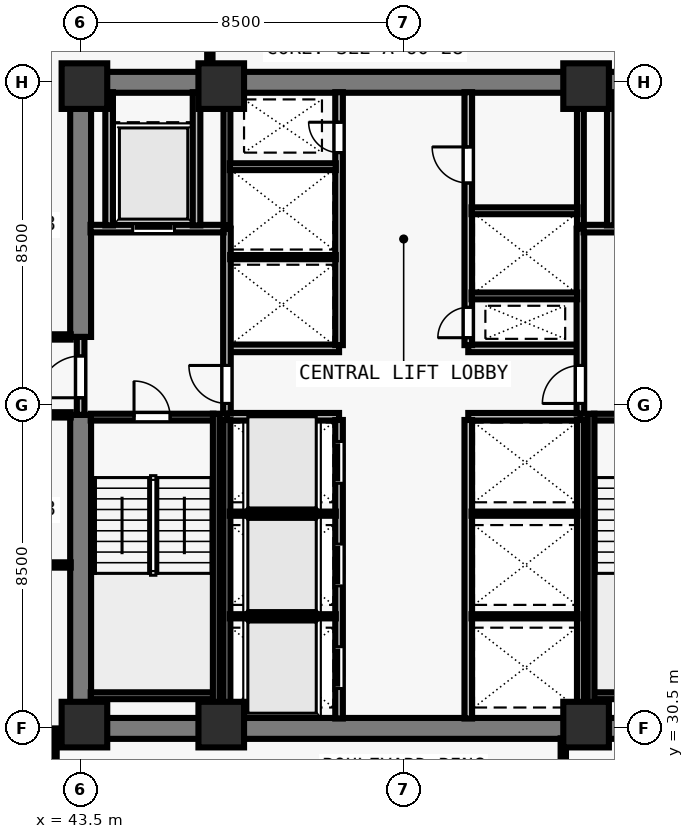
"""IFC4 building model, lengths in metres.
Left out: names, types, materials, properties, quantities, classifications, styles, units other than length and angle.
Written with IfcOpenShell. Run it as: python <this file> out.ifc"""

import sys

from ifc_helpers import new_model, si_unit, direction, frame, frame_2d, origin, origin_2d, place, context, subcontext, project, spatial, rectangle, extrude, element, fill, save


model = new_model("IFC4")
c1 = context("Model", 3, precision=1e-05, world=origin(), true_north=direction((0.0, 1.0)))
c2 = subcontext(c1, "Body", "Model", "MODEL_VIEW")
j1 = project(units=[si_unit("LENGTHUNIT", "METRE"), si_unit("PLANEANGLEUNIT", "RADIAN")], contexts=[c1])
p1 = place(None, origin())
s1 = spatial("IfcSite", under=j1, at=p1, CompositionType="ELEMENT")
p2 = place(p1, origin())
s2 = spatial("IfcBuilding", under=s1, at=p2, CompositionType="ELEMENT")
p3 = place(p2, frame((0.0, 0.0, 93.5)))
s3 = spatial("IfcBuildingStorey", under=s2, at=p3, CompositionType="ELEMENT", Elevation=93.5)
for number, where, z_axis, x_axis in (
    (1, (43.6, 30.6, 0.0), (0.0, 0.0, 1.0), (1.0, 0.0, 0.0)),
    (2, (47.2, 30.6, 0.0), (0.0, 0.0, 1.0), (1.0, 0.0, 0.0)),
    (3, (56.8, 30.6, 0.0), (0.0, 0.0, 1.0), (1.0, 0.0, 0.0)),
    (4, (43.6, 47.4, 0.0), (0.0, 0.0, 1.0), (1.0, 0.0, 0.0)),
    (5, (47.2, 47.4, 0.0), (0.0, 0.0, 1.0), (1.0, 0.0, 0.0)),
    (6, (56.8, 47.4, 0.0), (0.0, 0.0, 1.0), (1.0, 0.0, 0.0)),
):
    element("IfcColumn", number, at=place(p3, frame(where, z_axis=z_axis, x_axis=x_axis)), inside=s3, PredefinedType="COLUMN", context=c2, shape_type="SweptSolid", body=[
        extrude(rectangle(XDim=1.2, YDim=1.2, at=origin_2d()), origin(), (0.0, 0.0, 1.0), 3.5),
    ])
for number, where, z_axis, x_axis in (
    (7, (43.225, 30.5, 0.0), (0.0, 0.0, 1.0), (1.0, 0.0, 0.0)),
    (8, (43.225, 47.5, 0.0), (0.0, 0.0, 1.0), (1.0, 0.0, 0.0)),
):
    element("IfcWall", number, at=place(p3, frame(where, z_axis=z_axis, x_axis=x_axis)), inside=s3, PredefinedType="SHEAR", context=c2, shape_type="SweptSolid", body=[
        extrude(rectangle(XDim=17.55, YDim=0.55, at=frame_2d((8.775, 0.0))), origin(), (0.0, 0.0, 1.0), 3.24),
    ])
p4 = place(p3, frame((43.5, 30.765, 0.0), z_axis=(0.0, 0.0, 1.0), x_axis=(0.0, 1.0, 0.0)))
e9 = element("IfcWall", 9, at=p4, inside=s3, PredefinedType="SHEAR", context=c2, shape_type="SweptSolid", body=[
    extrude(rectangle(XDim=7.985, YDim=0.55, at=frame_2d((3.993, 0.0))), origin(), (0.0, 0.0, 1.0), 3.24),
])
p5 = place(p3, frame((43.5, 40.8, 0.0), z_axis=(0.0, 0.0, 1.0), x_axis=(0.0, 1.0, 0.0)))
e10 = element("IfcWall", 10, at=p5, inside=s3, PredefinedType="SHEAR", context=c2, shape_type="SweptSolid", body=[
    extrude(rectangle(XDim=6.435, YDim=0.55, at=frame_2d((3.218, 0.0))), origin(), (0.0, 0.0, 1.0), 3.24),
])
for number, where, z_axis, x_axis in (
    (11, (47.35, 38.7, 0.0), (0.0, 0.0, 1.0), (1.0, 0.0, 0.0)),
    (12, (47.35, 40.5, 0.0), (0.0, 0.0, 1.0), (1.0, 0.0, 0.0)),
    (13, (53.7, 38.7, 0.0), (0.0, 0.0, 1.0), (1.0, 0.0, 0.0)),
    (14, (53.7, 40.5, 0.0), (0.0, 0.0, 1.0), (1.0, 0.0, 0.0)),
):
    element("IfcWall", number, at=place(p3, frame(where, z_axis=z_axis, x_axis=x_axis)), inside=s3, PredefinedType="SOLIDWALL", context=c2, shape_type="SweptSolid", body=[
        extrude(rectangle(XDim=2.95, YDim=0.2, at=frame_2d((1.475, 0.0))), origin(), (0.0, 0.0, 1.0), 3.24),
    ])
p6 = place(p3, frame((50.3, 30.76, 0.0), z_axis=(0.0, 0.0, 1.0), x_axis=(0.0, 1.0, 0.0)))
e15 = element("IfcWall", 15, at=p6, inside=s3, PredefinedType="SOLIDWALL", context=c2, shape_type="SweptSolid", body=[
    extrude(rectangle(XDim=7.855, YDim=0.2, at=frame_2d((3.927, 0.0))), origin(), (0.0, 0.0, 1.0), 3.24),
])
p7 = place(p6, frame((0.79, 0.0, 0.0)))
e16 = element("IfcOpeningElement", 16, at=p7, cuts=e15, PredefinedType="OPENING", context=c2, shape_type="SweptSolid", body=[
    extrude(rectangle(XDim=1.1, YDim=2.2, at=frame_2d((0.55, 1.1))), frame((0.0, 0.11, 0.0), z_axis=(0.0, -1.0, 0.0), x_axis=(1.0, 0.0, 0.0)), (0.0, 0.0, 1.0), 0.22),
])
p8 = place(p6, frame((3.49, 0.0, 0.0)))
e17 = element("IfcOpeningElement", 17, at=p8, cuts=e15, PredefinedType="OPENING", context=c2, shape_type="SweptSolid", body=[
    extrude(rectangle(XDim=1.1, YDim=2.2, at=frame_2d((0.55, 1.1))), frame((0.0, 0.11, 0.0), z_axis=(0.0, -1.0, 0.0), x_axis=(1.0, 0.0, 0.0)), (0.0, 0.0, 1.0), 0.22),
])
p9 = place(p6, frame((6.19, 0.0, 0.0)))
e18 = element("IfcOpeningElement", 18, at=p9, cuts=e15, PredefinedType="OPENING", context=c2, shape_type="SweptSolid", body=[
    extrude(rectangle(XDim=1.1, YDim=2.2, at=frame_2d((0.55, 1.1))), frame((0.0, 0.11, 0.0), z_axis=(0.0, -1.0, 0.0), x_axis=(1.0, 0.0, 0.0)), (0.0, 0.0, 1.0), 0.22),
])
p10 = place(p3, frame((53.7, 30.76, 0.0), z_axis=(0.0, 0.0, 1.0), x_axis=(0.0, 1.0, 0.0)))
e19 = element("IfcWall", 19, at=p10, inside=s3, PredefinedType="SOLIDWALL", context=c2, shape_type="SweptSolid", body=[
    extrude(rectangle(XDim=7.855, YDim=0.2, at=frame_2d((3.927, 0.0))), origin(), (0.0, 0.0, 1.0), 3.24),
])
p11 = place(p3, frame((50.3, 40.585, 0.0), z_axis=(0.0, 0.0, 1.0), x_axis=(0.0, 1.0, 0.0)))
e20 = element("IfcWall", 20, at=p11, inside=s3, PredefinedType="SOLIDWALL", context=c2, shape_type="SweptSolid", body=[
    extrude(rectangle(XDim=6.655, YDim=0.2, at=frame_2d((3.328, 0.0))), origin(), (0.0, 0.0, 1.0), 3.24),
])
p12 = place(p11, frame((5.065, 0.0, 0.0)))
e21 = element("IfcOpeningElement", 21, at=p12, cuts=e20, PredefinedType="OPENING", context=c2, shape_type="SweptSolid", body=[
    extrude(rectangle(XDim=0.8, YDim=2.08, at=frame_2d((0.4, 1.04))), frame((0.0, 0.11, 0.0), z_axis=(0.0, -1.0, 0.0), x_axis=(1.0, 0.0, 0.0)), (0.0, 0.0, 1.0), 0.22),
])
p13 = place(p3, frame((53.7, 40.585, 0.0), z_axis=(0.0, 0.0, 1.0), x_axis=(0.0, 1.0, 0.0)))
e22 = element("IfcWall", 22, at=p13, inside=s3, PredefinedType="SOLIDWALL", context=c2, shape_type="SweptSolid", body=[
    extrude(rectangle(XDim=6.655, YDim=0.2, at=frame_2d((3.328, 0.0))), origin(), (0.0, 0.0, 1.0), 3.24),
])
p14 = place(p13, frame((0.195, 0.0, 0.0)))
e23 = element("IfcOpeningElement", 23, at=p14, cuts=e22, PredefinedType="OPENING", context=c2, shape_type="SweptSolid", body=[
    extrude(rectangle(XDim=0.8, YDim=2.08, at=frame_2d((0.4, 1.04))), frame((0.0, 0.11, 0.0), z_axis=(0.0, -1.0, 0.0), x_axis=(1.0, 0.0, 0.0)), (0.0, 0.0, 1.0), 0.22),
])
p15 = place(p13, frame((4.265, 0.0, 0.0)))
e24 = element("IfcOpeningElement", 24, at=p15, cuts=e22, PredefinedType="OPENING", context=c2, shape_type="SweptSolid", body=[
    extrude(rectangle(XDim=0.95, YDim=2.12, at=frame_2d((0.475, 1.06))), frame((0.0, 0.11, 0.0), z_axis=(0.0, -1.0, 0.0), x_axis=(1.0, 0.0, 0.0)), (0.0, 0.0, 1.0), 0.22),
])
p16 = place(p3, frame((43.5, 38.75, 0.0), z_axis=(0.0, 0.0, 1.0), x_axis=(0.0, 1.0, 0.0)))
e25 = element("IfcWall", 25, at=p16, inside=s3, PredefinedType="SOLIDWALL", context=c2, shape_type="SweptSolid", body=[
    extrude(rectangle(XDim=2.05, YDim=0.2, at=frame_2d((1.025, 0.0))), origin(), (0.0, 0.0, 1.0), 3.24),
])
p17 = place(p16, frame((0.45, 0.0, 0.0)))
e26 = element("IfcOpeningElement", 26, at=p17, cuts=e25, PredefinedType="OPENING", context=c2, shape_type="SweptSolid", body=[
    extrude(rectangle(XDim=1.1, YDim=2.15, at=frame_2d((0.55, 1.075))), frame((0.0, 0.11, 0.0), z_axis=(0.0, -1.0, 0.0), x_axis=(1.0, 0.0, 0.0)), (0.0, 0.0, 1.0), 0.22),
])
p18 = place(p3, frame((47.35, 38.785, 0.0), z_axis=(0.0, 0.0, 1.0), x_axis=(0.0, 1.0, 0.0)))
e27 = element("IfcWall", 27, at=p18, inside=s3, PredefinedType="SOLIDWALL", context=c2, shape_type="SweptSolid", body=[
    extrude(rectangle(XDim=4.865, YDim=0.2, at=frame_2d((2.433, 0.0))), origin(), (0.0, 0.0, 1.0), 3.24),
])
p19 = place(p18, frame((0.265, 0.0, 0.0)))
e28 = element("IfcOpeningElement", 28, at=p19, cuts=e27, PredefinedType="OPENING", context=c2, shape_type="SweptSolid", body=[
    extrude(rectangle(XDim=1.0, YDim=2.15, at=frame_2d((0.5, 1.075))), frame((0.0, 0.11, 0.0), z_axis=(0.0, -1.0, 0.0), x_axis=(1.0, 0.0, 0.0)), (0.0, 0.0, 1.0), 0.22),
])
p20 = place(p3, frame((43.76, 43.65, 0.0), z_axis=(0.0, 0.0, 1.0), x_axis=(1.0, 0.0, 0.0)))
e29 = element("IfcWall", 29, at=p20, inside=s3, PredefinedType="SOLIDWALL", context=c2, shape_type="SweptSolid", body=[
    extrude(rectangle(XDim=3.505, YDim=0.2, at=frame_2d((1.752, 0.0))), origin(), (0.0, 0.0, 1.0), 3.24),
])
p21 = place(p20, frame((1.11, 0.0, 0.0)))
e30 = element("IfcOpeningElement", 30, at=p21, cuts=e29, PredefinedType="OPENING", context=c2, shape_type="SweptSolid", body=[
    extrude(rectangle(XDim=1.1, YDim=2.2, at=frame_2d((0.55, 1.1))), frame((0.0, 0.11, 0.0), z_axis=(0.0, -1.0, 0.0), x_axis=(1.0, 0.0, 0.0)), (0.0, 0.0, 1.0), 0.22),
])
for number, where, z_axis, x_axis in (
    (31, (46.55, 43.735, 0.0), (0.0, 0.0, 1.0), (0.0, 1.0, 0.0)),
    (32, (44.25, 43.735, 0.0), (0.0, 0.0, 1.0), (0.0, 1.0, 0.0)),
):
    element("IfcWall", number, at=place(p3, frame(where, z_axis=z_axis, x_axis=x_axis)), inside=s3, PredefinedType="SOLIDWALL", context=c2, shape_type="SweptSolid", body=[
        extrude(rectangle(XDim=3.505, YDim=0.2, at=frame_2d((1.752, 0.0))), origin(), (0.0, 0.0, 1.0), 3.24),
    ])
p22 = place(p3, frame((56.65, 38.785, 0.0), z_axis=(0.0, 0.0, 1.0), x_axis=(0.0, 1.0, 0.0)))
e33 = element("IfcWall", 33, at=p22, inside=s3, PredefinedType="SOLIDWALL", context=c2, shape_type="SweptSolid", body=[
    extrude(rectangle(XDim=4.865, YDim=0.2, at=frame_2d((2.433, 0.0))), origin(), (0.0, 0.0, 1.0), 3.24),
])
p23 = place(p22, frame((0.265, 0.0, 0.0)))
e34 = element("IfcOpeningElement", 34, at=p23, cuts=e33, PredefinedType="OPENING", context=c2, shape_type="SweptSolid", body=[
    extrude(rectangle(XDim=1.0, YDim=2.15, at=frame_2d((0.5, 1.075))), frame((0.0, 0.11, 0.0), z_axis=(0.0, -1.0, 0.0), x_axis=(1.0, 0.0, 0.0)), (0.0, 0.0, 1.0), 0.22),
])
p24 = place(p3, frame((56.735, 43.65, 0.0), z_axis=(0.0, 0.0, 1.0), x_axis=(1.0, 0.0, 0.0)))
e35 = element("IfcWall", 35, at=p24, inside=s3, PredefinedType="SOLIDWALL", context=c2, shape_type="SweptSolid", body=[
    extrude(rectangle(XDim=3.505, YDim=0.2, at=frame_2d((1.752, 0.0))), origin(), (0.0, 0.0, 1.0), 3.24),
])
p25 = place(p24, frame((1.295, 0.0, 0.0)))
e36 = element("IfcOpeningElement", 36, at=p25, cuts=e35, PredefinedType="OPENING", context=c2, shape_type="SweptSolid", body=[
    extrude(rectangle(XDim=1.1, YDim=2.2, at=frame_2d((0.55, 1.1))), frame((0.0, 0.11, 0.0), z_axis=(0.0, -1.0, 0.0), x_axis=(1.0, 0.0, 0.0)), (0.0, 0.0, 1.0), 0.22),
])
p26 = place(p3, frame((57.45, 43.735, 0.0), z_axis=(0.0, 0.0, 1.0), x_axis=(0.0, 1.0, 0.0)))
e37 = element("IfcWall", 37, at=p26, inside=s3, PredefinedType="SOLIDWALL", context=c2, shape_type="SweptSolid", body=[
    extrude(rectangle(XDim=3.505, YDim=0.2, at=frame_2d((1.752, 0.0))), origin(), (0.0, 0.0, 1.0), 3.24),
])
p27 = place(p3, frame((47.35, 30.76, 0.0), z_axis=(0.0, 0.0, 1.0), x_axis=(0.0, 1.0, 0.0)))
e38 = element("IfcWall", 38, at=p27, inside=s3, PredefinedType="SOLIDWALL", context=c2, shape_type="SweptSolid", body=[
    extrude(rectangle(XDim=7.855, YDim=0.18, at=frame_2d((3.927, 0.0))), origin(), (0.0, 0.0, 1.0), 3.24),
])
for number, where, z_axis, x_axis in (
    (39, (47.425, 33.45, 0.0), (0.0, 0.0, 1.0), (1.0, 0.0, 0.0)),
    (40, (47.425, 36.15, 0.0), (0.0, 0.0, 1.0), (1.0, 0.0, 0.0)),
):
    element("IfcWall", number, at=place(p3, frame(where, z_axis=z_axis, x_axis=x_axis)), inside=s3, PredefinedType="PARTITIONING", context=c2, shape_type="SweptSolid", body=[
        extrude(rectangle(XDim=2.79, YDim=0.11, at=frame_2d((1.395, 0.0))), origin(), (0.0, 0.0, 1.0), 3.24),
    ])
p28 = place(p3, frame((56.65, 30.76, 0.0), z_axis=(0.0, 0.0, 1.0), x_axis=(0.0, 1.0, 0.0)))
e41 = element("IfcWall", 41, at=p28, inside=s3, PredefinedType="SOLIDWALL", context=c2, shape_type="SweptSolid", body=[
    extrude(rectangle(XDim=7.855, YDim=0.18, at=frame_2d((3.927, 0.0))), origin(), (0.0, 0.0, 1.0), 3.24),
])
for number, where, z_axis, x_axis in (
    (42, (53.785, 33.45, 0.0), (0.0, 0.0, 1.0), (1.0, 0.0, 0.0)),
    (43, (53.785, 36.15, 0.0), (0.0, 0.0, 1.0), (1.0, 0.0, 0.0)),
):
    element("IfcWall", number, at=place(p3, frame(where, z_axis=z_axis, x_axis=x_axis)), inside=s3, PredefinedType="PARTITIONING", context=c2, shape_type="SweptSolid", body=[
        extrude(rectangle(XDim=2.79, YDim=0.11, at=frame_2d((1.395, 0.0))), origin(), (0.0, 0.0, 1.0), 3.24),
    ])
p29 = place(p3, frame((47.35, 43.735, 0.0), z_axis=(0.0, 0.0, 1.0), x_axis=(0.0, 1.0, 0.0)))
e44 = element("IfcWall", 44, at=p29, inside=s3, PredefinedType="SOLIDWALL", context=c2, shape_type="SweptSolid", body=[
    extrude(rectangle(XDim=3.505, YDim=0.18, at=frame_2d((1.752, 0.0))), origin(), (0.0, 0.0, 1.0), 3.24),
])
p30 = place(p3, frame((47.435, 42.9, 0.0), z_axis=(0.0, 0.0, 1.0), x_axis=(1.0, 0.0, 0.0)))
e45 = element("IfcWall", 45, at=p30, inside=s3, PredefinedType="PARTITIONING", context=c2, shape_type="SweptSolid", body=[
    extrude(rectangle(XDim=2.78, YDim=0.11, at=frame_2d((1.39, 0.0))), origin(), (0.0, 0.0, 1.0), 3.24),
])
p31 = place(p3, frame((47.425, 45.28, 0.0), z_axis=(0.0, 0.0, 1.0), x_axis=(1.0, 0.0, 0.0)))
e46 = element("IfcWall", 46, at=p31, inside=s3, PredefinedType="SOLIDWALL", context=c2, shape_type="SweptSolid", body=[
    extrude(rectangle(XDim=2.79, YDim=0.18, at=frame_2d((1.395, 0.0))), origin(), (0.0, 0.0, 1.0), 3.24),
])
p32 = place(p3, frame((56.65, 43.735, 0.0), z_axis=(0.0, 0.0, 1.0), x_axis=(0.0, 1.0, 0.0)))
e47 = element("IfcWall", 47, at=p32, inside=s3, PredefinedType="SOLIDWALL", context=c2, shape_type="SweptSolid", body=[
    extrude(rectangle(XDim=3.505, YDim=0.18, at=frame_2d((1.752, 0.0))), origin(), (0.0, 0.0, 1.0), 3.24),
])
p33 = place(p3, frame((53.785, 41.88, 0.0), z_axis=(0.0, 0.0, 1.0), x_axis=(1.0, 0.0, 0.0)))
e48 = element("IfcWall", 48, at=p33, inside=s3, PredefinedType="SOLIDWALL", context=c2, shape_type="SweptSolid", body=[
    extrude(rectangle(XDim=2.78, YDim=0.18, at=frame_2d((1.39, 0.0))), origin(), (0.0, 0.0, 1.0), 3.24),
])
p34 = place(p3, frame((53.785, 44.12, 0.0), z_axis=(0.0, 0.0, 1.0), x_axis=(1.0, 0.0, 0.0)))
e49 = element("IfcWall", 49, at=p34, inside=s3, PredefinedType="SOLIDWALL", context=c2, shape_type="SweptSolid", body=[
    extrude(rectangle(XDim=2.79, YDim=0.18, at=frame_2d((1.395, 0.0))), origin(), (0.0, 0.0, 1.0), 3.24),
])
for number, where, z_axis, x_axis in (
    (50, (39.655, 38.75, 0.0), (0.0, 0.0, 1.0), (1.0, 0.0, 0.0)),
    (51, (39.655, 40.8, 0.0), (0.0, 0.0, 1.0), (1.0, 0.0, 0.0)),
):
    element("IfcWall", number, at=place(p3, frame(where, z_axis=z_axis, x_axis=x_axis)), inside=s3, PredefinedType="PARTITIONING", context=c2, shape_type="SweptSolid", body=[
        extrude(rectangle(XDim=3.585, YDim=0.14, at=frame_2d((1.792, 0.0))), origin(), (0.0, 0.0, 1.0), 3.24),
    ])
p35 = place(p3, frame((42.8, 26.505, 0.0), z_axis=(0.0, 0.0, 1.0), x_axis=(0.0, 1.0, 0.0)))
e52 = element("IfcWall", 52, at=p35, inside=s3, PredefinedType="PARTITIONING", context=c2, shape_type="SweptSolid", body=[
    extrude(rectangle(XDim=3.995, YDim=0.14, at=frame_2d((1.998, 0.0))), origin(), (0.0, 0.0, 1.0), 2.399),
])
p36 = place(p3, frame((56.2, 26.505, 0.0), z_axis=(0.0, 0.0, 1.0), x_axis=(0.0, 1.0, 0.0)))
e53 = element("IfcWall", 53, at=p36, inside=s3, PredefinedType="PARTITIONING", context=c2, shape_type="SweptSolid", body=[
    extrude(rectangle(XDim=3.735, YDim=0.14, at=frame_2d((1.868, 0.0))), origin(), (0.0, 0.0, 1.0), 2.809),
])
p37 = place(p3, frame((46.9, 47.76, 0.0), z_axis=(0.0, 0.0, 1.0), x_axis=(0.0, 1.0, 0.0)))
e54 = element("IfcWall", 54, at=p37, inside=s3, PredefinedType="PARTITIONING", context=c2, shape_type="SweptSolid", body=[
    extrude(rectangle(XDim=3.735, YDim=0.14, at=frame_2d((1.868, 0.0))), origin(), (0.0, 0.0, 1.0), 3.24),
])
p38 = place(p3, frame((39.655, 34.8, 0.0), z_axis=(0.0, 0.0, 1.0), x_axis=(1.0, 0.0, 0.0)))
e55 = element("IfcWall", 55, at=p38, inside=s3, PredefinedType="PARTITIONING", context=c2, shape_type="SweptSolid", body=[
    extrude(rectangle(XDim=3.585, YDim=0.14, at=frame_2d((1.792, 0.0))), origin(), (0.0, 0.0, 1.0), 3.24),
])
p39 = place(p3, frame((43.765, 38.69, 0.0), z_axis=(0.0, 0.0, 1.0), x_axis=(1.0, 0.0, 0.0)))
e56 = element("IfcWall", 56, at=p39, inside=s3, PredefinedType="SOLIDWALL", context=c2, shape_type="SweptSolid", body=[
    extrude(rectangle(XDim=3.23, YDim=0.18, at=frame_2d((1.615, 0.0))), origin(), (0.0, 0.0, 1.0), 3.24),
])
p40 = place(p39, frame((1.14, 0.0, 0.0)))
e57 = element("IfcOpeningElement", 57, at=p40, cuts=e56, PredefinedType="OPENING", context=c2, shape_type="SweptSolid", body=[
    extrude(rectangle(XDim=0.95, YDim=2.15, at=frame_2d((0.475, 1.075))), frame((0.0, 0.1, 0.0), z_axis=(0.0, -1.0, 0.0), x_axis=(1.0, 0.0, 0.0)), (0.0, 0.0, 1.0), 0.2),
])
p41 = place(p3, frame((43.765, 31.36, 0.0), z_axis=(0.0, 0.0, 1.0), x_axis=(1.0, 0.0, 0.0)))
e58 = element("IfcWall", 58, at=p41, inside=s3, PredefinedType="SOLIDWALL", context=c2, shape_type="SweptSolid", body=[
    extrude(rectangle(XDim=3.23, YDim=0.18, at=frame_2d((1.615, 0.0))), origin(), (0.0, 0.0, 1.0), 3.24),
])
p42 = place(p3, frame((47.07, 38.78, 0.0), z_axis=(0.0, 0.0, 1.0), x_axis=(0.0, -1.0, 0.0)))
e59 = element("IfcWall", 59, at=p42, inside=s3, PredefinedType="SOLIDWALL", context=c2, shape_type="SweptSolid", body=[
    extrude(rectangle(XDim=8.017, YDim=0.18, at=frame_2d((4.009, 0.0))), origin(), (0.0, 0.0, 1.0), 3.24),
])
p43 = place(p3, frame((57.005, 38.69, 0.0), z_axis=(0.0, 0.0, 1.0), x_axis=(1.0, 0.0, 0.0)))
e60 = element("IfcWall", 60, at=p43, inside=s3, PredefinedType="SOLIDWALL", context=c2, shape_type="SweptSolid", body=[
    extrude(rectangle(XDim=3.23, YDim=0.18, at=frame_2d((1.615, 0.0))), origin(), (0.0, 0.0, 1.0), 3.24),
])
p44 = place(p43, frame((1.14, 0.0, 0.0)))
e61 = element("IfcOpeningElement", 61, at=p44, cuts=e60, PredefinedType="OPENING", context=c2, shape_type="SweptSolid", body=[
    extrude(rectangle(XDim=0.95, YDim=2.15, at=frame_2d((0.475, 1.075))), frame((0.0, 0.1, 0.0), z_axis=(0.0, -1.0, 0.0), x_axis=(1.0, 0.0, 0.0)), (0.0, 0.0, 1.0), 0.2),
])
p45 = place(p3, frame((57.005, 31.36, 0.0), z_axis=(0.0, 0.0, 1.0), x_axis=(1.0, 0.0, 0.0)))
e62 = element("IfcWall", 62, at=p45, inside=s3, PredefinedType="SOLIDWALL", context=c2, shape_type="SweptSolid", body=[
    extrude(rectangle(XDim=3.23, YDim=0.18, at=frame_2d((1.615, 0.0))), origin(), (0.0, 0.0, 1.0), 3.24),
])
p46 = place(p3, frame((56.93, 38.78, 0.0), z_axis=(0.0, 0.0, 1.0), x_axis=(0.0, -1.0, 0.0)))
e63 = element("IfcWall", 63, at=p46, inside=s3, PredefinedType="SOLIDWALL", context=c2, shape_type="SweptSolid", body=[
    extrude(rectangle(XDim=8.017, YDim=0.18, at=frame_2d((4.009, 0.0))), origin(), (0.0, 0.0, 1.0), 3.24),
])
p47 = place(p17, origin())
e64 = element("IfcDoor", 64, at=p47, inside=s3, OperationType="SINGLE_SWING_LEFT", PredefinedType="DOOR", context=c2, shape_type="SweptSolid", body=[
    extrude(rectangle(XDim=1.1, YDim=2.15, at=frame_2d((0.55, 1.075))), frame((0.0, 0.025, 0.0), z_axis=(0.0, -1.0, 0.0), x_axis=(1.0, 0.0, 0.0)), (0.0, 0.0, 1.0), 0.05),
])
fill(e26, e64)
p48 = place(p19, origin())
e65 = element("IfcDoor", 65, at=p48, inside=s3, OperationType="SINGLE_SWING_RIGHT", PredefinedType="DOOR", context=c2, shape_type="SweptSolid", body=[
    extrude(rectangle(XDim=1.0, YDim=2.15, at=frame_2d((0.5, 1.075))), frame((0.0, 0.025, 0.0), z_axis=(0.0, -1.0, 0.0), x_axis=(1.0, 0.0, 0.0)), (0.0, 0.0, 1.0), 0.05),
])
fill(e28, e65)
p49 = place(p21, origin())
e66 = element("IfcDoor", 66, at=p49, inside=s3, OperationType="SLIDING_TO_LEFT", PredefinedType="DOOR", context=c2, shape_type="SweptSolid", body=[
    extrude(rectangle(XDim=1.1, YDim=2.2, at=frame_2d((0.55, 1.1))), frame((0.0, 0.025, 0.0), z_axis=(0.0, -1.0, 0.0), x_axis=(1.0, 0.0, 0.0)), (0.0, 0.0, 1.0), 0.05),
])
fill(e30, e66)
p50 = place(p23, origin())
e67 = element("IfcDoor", 67, at=p50, inside=s3, OperationType="SINGLE_SWING_LEFT", PredefinedType="DOOR", context=c2, shape_type="SweptSolid", body=[
    extrude(rectangle(XDim=1.0, YDim=2.15, at=frame_2d((0.5, 1.075))), frame((0.0, 0.025, 0.0), z_axis=(0.0, -1.0, 0.0), x_axis=(1.0, 0.0, 0.0)), (0.0, 0.0, 1.0), 0.05),
])
fill(e34, e67)
p51 = place(p7, origin())
e68 = element("IfcDoor", 68, at=p51, inside=s3, OperationType="SLIDING_TO_LEFT", PredefinedType="DOOR", context=c2, shape_type="SweptSolid", body=[
    extrude(rectangle(XDim=1.1, YDim=2.2, at=frame_2d((0.55, 1.1))), frame((0.0, 0.025, 0.0), z_axis=(0.0, -1.0, 0.0), x_axis=(1.0, 0.0, 0.0)), (0.0, 0.0, 1.0), 0.05),
])
fill(e16, e68)
p52 = place(p8, origin())
e69 = element("IfcDoor", 69, at=p52, inside=s3, OperationType="SLIDING_TO_LEFT", PredefinedType="DOOR", context=c2, shape_type="SweptSolid", body=[
    extrude(rectangle(XDim=1.1, YDim=2.2, at=frame_2d((0.55, 1.1))), frame((0.0, 0.025, 0.0), z_axis=(0.0, -1.0, 0.0), x_axis=(1.0, 0.0, 0.0)), (0.0, 0.0, 1.0), 0.05),
])
fill(e17, e69)
p53 = place(p9, origin())
e70 = element("IfcDoor", 70, at=p53, inside=s3, OperationType="SLIDING_TO_LEFT", PredefinedType="DOOR", context=c2, shape_type="SweptSolid", body=[
    extrude(rectangle(XDim=1.1, YDim=2.2, at=frame_2d((0.55, 1.1))), frame((0.0, 0.025, 0.0), z_axis=(0.0, -1.0, 0.0), x_axis=(1.0, 0.0, 0.0)), (0.0, 0.0, 1.0), 0.05),
])
fill(e18, e70)
p54 = place(p12, origin())
e71 = element("IfcDoor", 71, at=p54, inside=s3, OperationType="SINGLE_SWING_RIGHT", PredefinedType="DOOR", context=c2, shape_type="SweptSolid", body=[
    extrude(rectangle(XDim=0.8, YDim=2.08, at=frame_2d((0.4, 1.04))), frame((0.0, 0.025, 0.0), z_axis=(0.0, -1.0, 0.0), x_axis=(1.0, 0.0, 0.0)), (0.0, 0.0, 1.0), 0.05),
])
fill(e21, e71)
p55 = place(p14, origin())
e72 = element("IfcDoor", 72, at=p55, inside=s3, OperationType="SINGLE_SWING_LEFT", PredefinedType="DOOR", context=c2, shape_type="SweptSolid", body=[
    extrude(rectangle(XDim=0.8, YDim=2.08, at=frame_2d((0.4, 1.04))), frame((0.0, 0.025, 0.0), z_axis=(0.0, -1.0, 0.0), x_axis=(1.0, 0.0, 0.0)), (0.0, 0.0, 1.0), 0.05),
])
fill(e23, e72)
p56 = place(p15, origin())
e73 = element("IfcDoor", 73, at=p56, inside=s3, OperationType="SINGLE_SWING_RIGHT", PredefinedType="DOOR", context=c2, shape_type="SweptSolid", body=[
    extrude(rectangle(XDim=0.95, YDim=2.12, at=frame_2d((0.475, 1.06))), frame((0.0, 0.025, 0.0), z_axis=(0.0, -1.0, 0.0), x_axis=(1.0, 0.0, 0.0)), (0.0, 0.0, 1.0), 0.05),
])
fill(e24, e73)
p57 = place(p40, origin())
e74 = element("IfcDoor", 74, at=p57, inside=s3, OperationType="SINGLE_SWING_LEFT", PredefinedType="DOOR", context=c2, shape_type="SweptSolid", body=[
    extrude(rectangle(XDim=0.95, YDim=2.15, at=frame_2d((0.475, 1.075))), frame((0.0, 0.025, 0.0), z_axis=(0.0, -1.0, 0.0), x_axis=(1.0, 0.0, 0.0)), (0.0, 0.0, 1.0), 0.05),
])
fill(e57, e74)
save(model, sys.argv[1])
